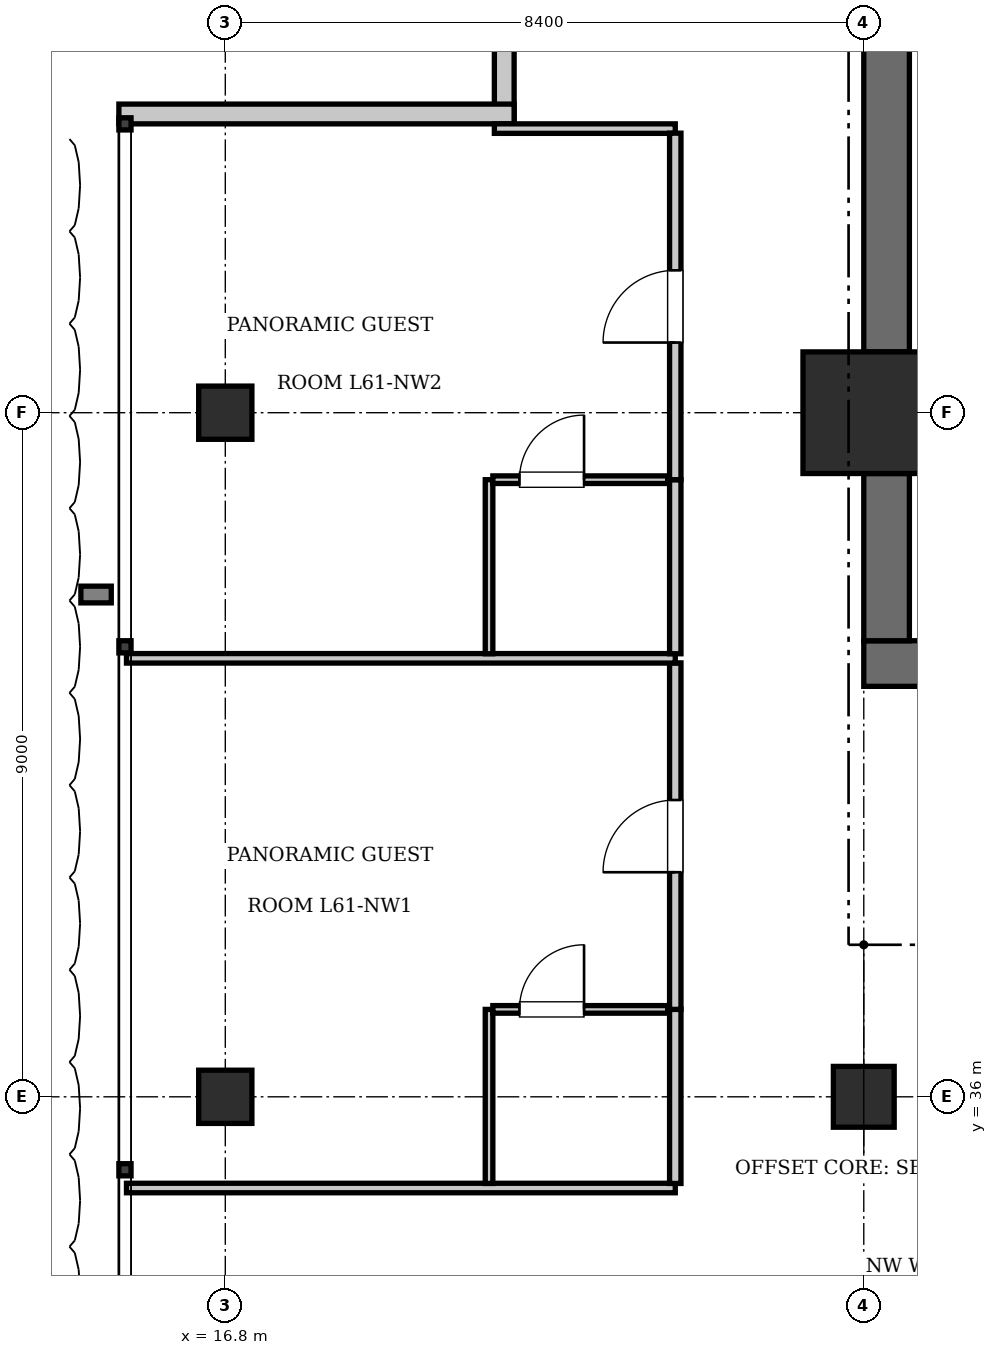
"""IFC4 building model, lengths in metres.
Left out: names, types, materials, properties, quantities, classifications, styles, units other than length and angle.
Written with IfcOpenShell. Run it as: python <this file> out.ifc"""

import sys

from ifc_helpers import new_model, si_unit, direction, frame, frame_2d, origin, origin_2d, place, context, subcontext, project, spatial, rectangle, extrude, element, fill, save


model = new_model("IFC4")
c1 = context("Model", 3, precision=1e-05, world=origin(), true_north=direction((0.0, 1.0)))
c2 = subcontext(c1, "Body", "Model", "MODEL_VIEW")
j1 = project(units=[si_unit("LENGTHUNIT", "METRE"), si_unit("PLANEANGLEUNIT", "RADIAN")], contexts=[c1])
p1 = place(None, origin())
s1 = spatial("IfcSite", under=j1, at=p1, CompositionType="ELEMENT")
p2 = place(p1, origin())
s2 = spatial("IfcBuilding", under=s1, at=p2, CompositionType="ELEMENT")
p3 = place(p2, frame((0.0, 0.0, 250.95)))
s3 = spatial("IfcBuildingStorey", under=s2, at=p3, CompositionType="ELEMENT", Elevation=250.95)
p4 = place(p3, frame((25.2, 45.0, 0.0), z_axis=(0.0, 0.0, 1.0), x_axis=(1.0, 0.0, 0.0)))
e1 = element("IfcColumn", 1, at=p4, inside=s3, PredefinedType="COLUMN", context=c2, shape_type="SweptSolid", body=[
    extrude(rectangle(XDim=1.6, YDim=1.6, at=origin_2d()), origin(), (0.0, 0.0, 1.0), 3.85),
])
p5 = place(p3, frame((25.2, 41.7, 0.0), z_axis=(0.0, 0.0, 1.0), x_axis=(1.0, 0.0, 0.0)))
e2 = element("IfcWall", 2, at=p5, inside=s3, PredefinedType="SHEAR", context=c2, shape_type="SweptSolid", body=[
    extrude(rectangle(XDim=6.8, YDim=0.6, at=frame_2d((3.4, 0.0))), origin(), (0.0, 0.0, 1.0), 3.85),
])
p6 = place(p5, frame((1.65, 0.0, 0.0)))
e3 = element("IfcOpeningElement", 3, at=p6, cuts=e2, PredefinedType="OPENING", context=c2, shape_type="SweptSolid", body=[
    extrude(rectangle(XDim=1.15, YDim=2.15, at=frame_2d((0.575, 1.075))), frame((0.0, 0.31, 0.0), z_axis=(0.0, -1.0, 0.0), x_axis=(1.0, 0.0, 0.0)), (0.0, 0.0, 1.0), 0.62),
])
p7 = place(p5, frame((5.15, 0.0, 0.0)))
e4 = element("IfcOpeningElement", 4, at=p7, cuts=e2, PredefinedType="OPENING", context=c2, shape_type="SweptSolid", body=[
    extrude(rectangle(XDim=1.1, YDim=2.2, at=frame_2d((0.55, 1.1))), frame((0.0, 0.31, 0.0), z_axis=(0.0, -1.0, 0.0), x_axis=(1.0, 0.0, 0.0)), (0.0, 0.0, 1.0), 0.62),
])
p8 = place(p3, frame((25.5, 42.0, 0.0), z_axis=(0.0, 0.0, 1.0), x_axis=(0.0, 1.0, 0.0)))
e5 = element("IfcWall", 5, at=p8, inside=s3, PredefinedType="SHEAR", context=c2, shape_type="SweptSolid", body=[
    extrude(rectangle(XDim=2.2, YDim=0.6, at=frame_2d((1.1, 0.0))), origin(), (0.0, 0.0, 1.0), 3.85),
])
p9 = place(p3, frame((25.5, 45.8, 0.0), z_axis=(0.0, 0.0, 1.0), x_axis=(0.0, 1.0, 0.0)))
e6 = element("IfcWall", 6, at=p9, inside=s3, PredefinedType="SHEAR", context=c2, shape_type="SweptSolid", body=[
    extrude(rectangle(XDim=7.6, YDim=0.6, at=frame_2d((3.8, 0.0))), origin(), (0.0, 0.0, 1.0), 3.85),
])
p10 = place(p3, frame((25.2, 36.0, 0.0), z_axis=(0.0, 0.0, 1.0), x_axis=(1.0, 0.0, 0.0)))
e7 = element("IfcColumn", 7, at=p10, inside=s3, PredefinedType="COLUMN", context=c2, shape_type="SweptSolid", body=[
    extrude(rectangle(XDim=0.8, YDim=0.8, at=origin_2d()), origin(), (0.0, 0.0, 1.0), 3.85),
])
for number, where, z_axis, x_axis in (
    (8, (16.8, 36.0, 0.0), (0.0, 0.0, 1.0), (1.0, 0.0, 0.0)),
    (9, (16.8, 45.0, 0.0), (0.0, 0.0, 1.0), (1.0, 0.0, 0.0)),
):
    element("IfcColumn", number, at=place(p3, frame(where, z_axis=z_axis, x_axis=x_axis)), inside=s3, PredefinedType="COLUMN", context=c2, shape_type="SweptSolid", body=[
        extrude(rectangle(XDim=0.7, YDim=0.7, at=origin_2d()), origin(), (0.0, 0.0, 1.0), 3.85),
    ])
p11 = place(p3, frame((20.47, 48.8, 0.0), z_axis=(0.0, 0.0, 1.0), x_axis=(0.0, 1.0, 0.0)))
e10 = element("IfcWall", 10, at=p11, inside=s3, PredefinedType="SOLIDWALL", context=c2, shape_type="SweptSolid", body=[
    extrude(rectangle(XDim=5.2, YDim=0.26, at=frame_2d((2.6, 0.0))), origin(), (0.0, 0.0, 1.0), 3.61),
])
p12 = place(p3, frame((15.4, 48.93, 0.0), z_axis=(0.0, 0.0, 1.0), x_axis=(1.0, 0.0, 0.0)))
e11 = element("IfcWall", 11, at=p12, inside=s3, PredefinedType="SOLIDWALL", context=c2, shape_type="SweptSolid", body=[
    extrude(rectangle(XDim=5.2, YDim=0.26, at=frame_2d((2.6, 0.0))), origin(), (0.0, 0.0, 1.0), 3.61),
])
p13 = place(p3, frame((15.5, 34.8, 0.0), z_axis=(0.0, 0.0, 1.0), x_axis=(1.0, 0.0, 0.0)))
e12 = element("IfcWall", 12, at=p13, inside=s3, PredefinedType="PARTITIONING", context=c2, shape_type="SweptSolid", body=[
    extrude(rectangle(XDim=7.22, YDim=0.125, at=frame_2d((3.61, 0.0))), origin(), (0.0, 0.0, 1.0), 3.61),
])
p14 = place(p3, frame((20.34, 48.738, 0.0), z_axis=(0.0, 0.0, 1.0), x_axis=(1.0, 0.0, 0.0)))
e13 = element("IfcWall", 13, at=p14, inside=s3, PredefinedType="PARTITIONING", context=c2, shape_type="SweptSolid", body=[
    extrude(rectangle(XDim=2.38, YDim=0.125, at=frame_2d((1.19, 0.0))), origin(), (0.0, 0.0, 1.0), 3.61),
])
p15 = place(p3, frame((22.72, 34.86, 0.0), z_axis=(0.0, 0.0, 1.0), x_axis=(0.0, 1.0, 0.0)))
e14 = element("IfcWall", 14, at=p15, inside=s3, PredefinedType="PARTITIONING", context=c2, shape_type="SweptSolid", body=[
    extrude(rectangle(XDim=2.29, YDim=0.15, at=frame_2d((1.145, 0.0))), origin(), (0.0, 0.0, 1.0), 3.61),
])
p16 = place(p3, frame((22.72, 37.15, 0.0), z_axis=(0.0, 0.0, 1.0), x_axis=(0.0, 1.0, 0.0)))
e15 = element("IfcWall", 15, at=p16, inside=s3, PredefinedType="PARTITIONING", context=c2, shape_type="SweptSolid", body=[
    extrude(rectangle(XDim=4.559, YDim=0.15, at=frame_2d((2.279, 0.0))), origin(), (0.0, 0.0, 1.0), 3.61),
])
p17 = place(p16, frame((1.804, 0.0, 0.0)))
e16 = element("IfcOpeningElement", 16, at=p17, cuts=e15, PredefinedType="OPENING", context=c2, shape_type="SweptSolid", body=[
    extrude(rectangle(XDim=0.95, YDim=2.15, at=frame_2d((0.475, 1.075))), frame((0.0, 0.085, 0.0), z_axis=(0.0, -1.0, 0.0), x_axis=(1.0, 0.0, 0.0)), (0.0, 0.0, 1.0), 0.17),
])
p18 = place(p3, frame((20.27, 34.86, 0.0), z_axis=(0.0, 0.0, 1.0), x_axis=(0.0, 1.0, 0.0)))
e17 = element("IfcWall", 17, at=p18, inside=s3, PredefinedType="PARTITIONING", context=c2, shape_type="SweptSolid", body=[
    extrude(rectangle(XDim=2.29, YDim=0.1, at=frame_2d((1.145, 0.0))), origin(), (0.0, 0.0, 1.0), 3.61),
])
p19 = place(p3, frame((20.32, 37.15, 0.0), z_axis=(0.0, 0.0, 1.0), x_axis=(1.0, 0.0, 0.0)))
e18 = element("IfcWall", 18, at=p19, inside=s3, PredefinedType="PARTITIONING", context=c2, shape_type="SweptSolid", body=[
    extrude(rectangle(XDim=2.3, YDim=0.1, at=frame_2d((1.15, 0.0))), origin(), (0.0, 0.0, 1.0), 3.61),
])
p20 = place(p19, frame((0.35, 0.0, 0.0)))
e19 = element("IfcOpeningElement", 19, at=p20, cuts=e18, PredefinedType="OPENING", context=c2, shape_type="SweptSolid", body=[
    extrude(rectangle(XDim=0.85, YDim=2.1, at=frame_2d((0.425, 1.05))), frame((0.0, 0.06, 0.0), z_axis=(0.0, -1.0, 0.0), x_axis=(1.0, 0.0, 0.0)), (0.0, 0.0, 1.0), 0.12),
])
p21 = place(p3, frame((15.5, 41.769, 0.0), z_axis=(0.0, 0.0, 1.0), x_axis=(1.0, 0.0, 0.0)))
e20 = element("IfcWall", 20, at=p21, inside=s3, PredefinedType="PARTITIONING", context=c2, shape_type="SweptSolid", body=[
    extrude(rectangle(XDim=7.22, YDim=0.125, at=frame_2d((3.61, 0.0))), origin(), (0.0, 0.0, 1.0), 3.61),
])
p22 = place(p3, frame((22.72, 41.829, 0.0), z_axis=(0.0, 0.0, 1.0), x_axis=(0.0, 1.0, 0.0)))
e21 = element("IfcWall", 21, at=p22, inside=s3, PredefinedType="PARTITIONING", context=c2, shape_type="SweptSolid", body=[
    extrude(rectangle(XDim=2.29, YDim=0.15, at=frame_2d((1.145, 0.0))), origin(), (0.0, 0.0, 1.0), 3.61),
])
p23 = place(p3, frame((22.72, 44.119, 0.0), z_axis=(0.0, 0.0, 1.0), x_axis=(0.0, 1.0, 0.0)))
e22 = element("IfcWall", 22, at=p23, inside=s3, PredefinedType="PARTITIONING", context=c2, shape_type="SweptSolid", body=[
    extrude(rectangle(XDim=4.559, YDim=0.15, at=frame_2d((2.279, 0.0))), origin(), (0.0, 0.0, 1.0), 3.61),
])
p24 = place(p23, frame((1.804, 0.0, 0.0)))
e23 = element("IfcOpeningElement", 23, at=p24, cuts=e22, PredefinedType="OPENING", context=c2, shape_type="SweptSolid", body=[
    extrude(rectangle(XDim=0.95, YDim=2.15, at=frame_2d((0.475, 1.075))), frame((0.0, 0.085, 0.0), z_axis=(0.0, -1.0, 0.0), x_axis=(1.0, 0.0, 0.0)), (0.0, 0.0, 1.0), 0.17),
])
p25 = place(p3, frame((20.27, 41.829, 0.0), z_axis=(0.0, 0.0, 1.0), x_axis=(0.0, 1.0, 0.0)))
e24 = element("IfcWall", 24, at=p25, inside=s3, PredefinedType="PARTITIONING", context=c2, shape_type="SweptSolid", body=[
    extrude(rectangle(XDim=2.29, YDim=0.1, at=frame_2d((1.145, 0.0))), origin(), (0.0, 0.0, 1.0), 3.61),
])
p26 = place(p3, frame((20.32, 44.119, 0.0), z_axis=(0.0, 0.0, 1.0), x_axis=(1.0, 0.0, 0.0)))
e25 = element("IfcWall", 25, at=p26, inside=s3, PredefinedType="PARTITIONING", context=c2, shape_type="SweptSolid", body=[
    extrude(rectangle(XDim=2.3, YDim=0.1, at=frame_2d((1.15, 0.0))), origin(), (0.0, 0.0, 1.0), 3.61),
])
p27 = place(p26, frame((0.35, 0.0, 0.0)))
e26 = element("IfcOpeningElement", 26, at=p27, cuts=e25, PredefinedType="OPENING", context=c2, shape_type="SweptSolid", body=[
    extrude(rectangle(XDim=0.85, YDim=2.1, at=frame_2d((0.425, 1.05))), frame((0.0, 0.06, 0.0), z_axis=(0.0, -1.0, 0.0), x_axis=(1.0, 0.0, 0.0)), (0.0, 0.0, 1.0), 0.12),
])
p28 = place(p20, origin())
e27 = element("IfcDoor", 27, at=p28, inside=s3, OperationType="SINGLE_SWING_RIGHT", PredefinedType="DOOR", context=c2, shape_type="SweptSolid", body=[
    extrude(rectangle(XDim=0.85, YDim=2.1, at=frame_2d((0.425, 1.05))), frame((0.0, 0.025, 0.0), z_axis=(0.0, -1.0, 0.0), x_axis=(1.0, 0.0, 0.0)), (0.0, 0.0, 1.0), 0.05),
])
fill(e19, e27)
p29 = place(p17, origin())
e28 = element("IfcDoor", 28, at=p29, inside=s3, OperationType="SINGLE_SWING_LEFT", PredefinedType="DOOR", context=c2, shape_type="SweptSolid", body=[
    extrude(rectangle(XDim=0.95, YDim=2.15, at=frame_2d((0.475, 1.075))), frame((0.0, 0.025, 0.0), z_axis=(0.0, -1.0, 0.0), x_axis=(1.0, 0.0, 0.0)), (0.0, 0.0, 1.0), 0.05),
])
fill(e16, e28)
p30 = place(p27, origin())
e29 = element("IfcDoor", 29, at=p30, inside=s3, OperationType="SINGLE_SWING_RIGHT", PredefinedType="DOOR", context=c2, shape_type="SweptSolid", body=[
    extrude(rectangle(XDim=0.85, YDim=2.1, at=frame_2d((0.425, 1.05))), frame((0.0, 0.025, 0.0), z_axis=(0.0, -1.0, 0.0), x_axis=(1.0, 0.0, 0.0)), (0.0, 0.0, 1.0), 0.05),
])
fill(e26, e29)
p31 = place(p24, origin())
e30 = element("IfcDoor", 30, at=p31, inside=s3, OperationType="SINGLE_SWING_LEFT", PredefinedType="DOOR", context=c2, shape_type="SweptSolid", body=[
    extrude(rectangle(XDim=0.95, YDim=2.15, at=frame_2d((0.475, 1.075))), frame((0.0, 0.025, 0.0), z_axis=(0.0, -1.0, 0.0), x_axis=(1.0, 0.0, 0.0)), (0.0, 0.0, 1.0), 0.05),
])
fill(e23, e30)
save(model, sys.argv[1])
